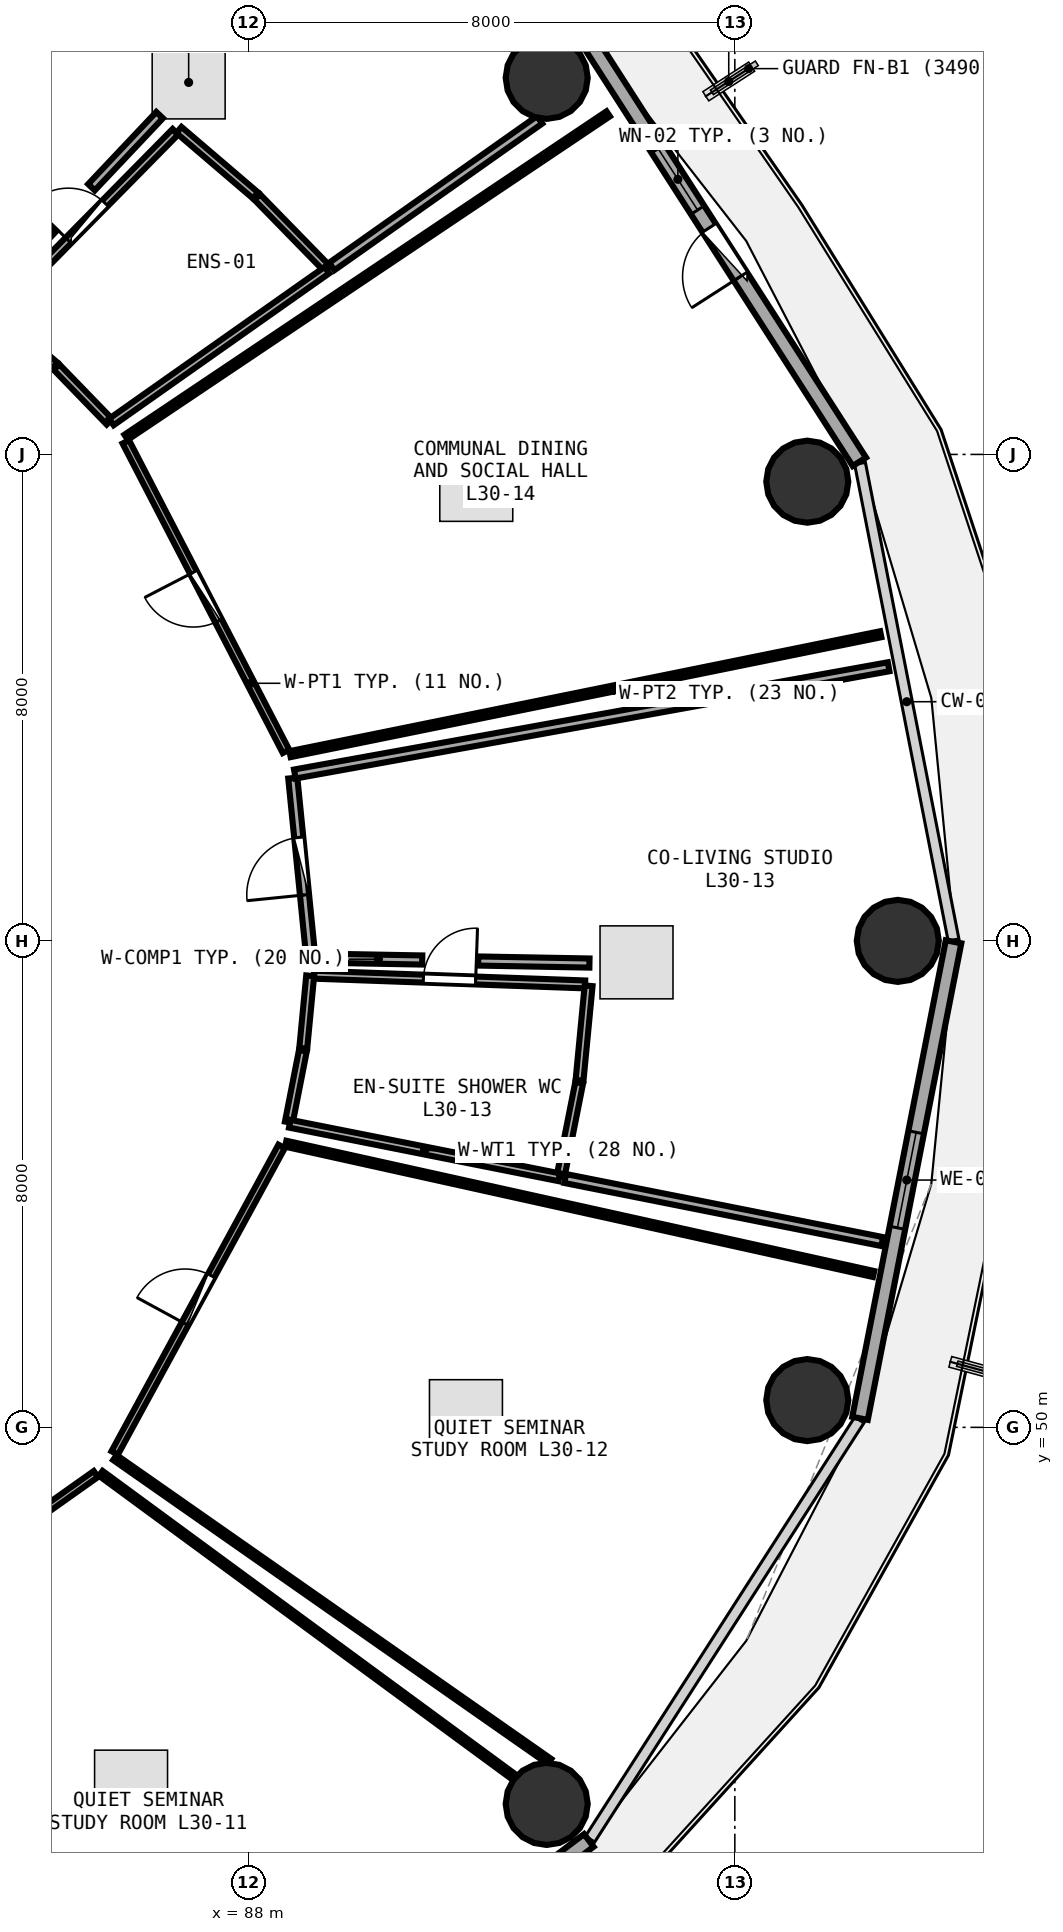
"""IFC4 building model, lengths in metres.
Left out: names, types, materials, properties, quantities, classifications, styles, units other than length and angle.
Written with IfcOpenShell. Run it as: python <this file> out.ifc"""

import sys

from ifc_helpers import new_model, si_unit, direction, frame, frame_2d, origin, origin_2d, place, context, subcontext, project, spatial, rectangle, circle, extrude, element, fill, save


model = new_model("IFC4")
c1 = context("Model", 3, precision=1e-05, world=origin(), true_north=direction((0.0, 1.0)))
c2 = subcontext(c1, "Body", "Model", "MODEL_VIEW")
j1 = project(units=[si_unit("LENGTHUNIT", "METRE"), si_unit("PLANEANGLEUNIT", "RADIAN")], contexts=[c1])
p1 = place(None, origin())
s1 = spatial("IfcSite", under=j1, at=p1, CompositionType="ELEMENT")
p2 = place(p1, origin())
s2 = spatial("IfcBuilding", under=s1, at=p2, CompositionType="ELEMENT")
p3 = place(p2, frame((0.0, 0.0, 117.6)))
s3 = spatial("IfcBuildingStorey", under=s2, at=p3, CompositionType="ELEMENT", Elevation=117.6)
for number, where, z_axis, x_axis in (
    (1, (98.68, 58.0, 0.0), (0.0, 0.0, 1.0), (1.0, 0.0, 0.0)),
    (2, (97.192, 65.552, 0.0), (0.0, 0.0, 1.0), (1.0, 0.0, 0.0)),
    (3, (92.906, 72.193, 0.0), (0.0, 0.0, 1.0), (1.0, 0.0, 0.0)),
    (4, (92.906, 43.807, 0.0), (0.0, 0.0, 1.0), (1.0, 0.0, 0.0)),
    (5, (97.192, 50.448, 0.0), (0.0, 0.0, 1.0), (1.0, 0.0, 0.0)),
):
    element("IfcColumn", number, at=place(p3, frame(where, z_axis=z_axis, x_axis=x_axis)), inside=s3, PredefinedType="COLUMN", context=c2, shape_type="SweptSolid", body=[
        extrude(circle(Radius=0.675, at=origin_2d()), origin(), (0.0, 0.0, 1.0), 3.75),
    ])
p4 = place(p3, frame((98.048, 65.879, 0.0), z_axis=(0.0, 0.0, 1.0), x_axis=(-0.540620528459, 0.841266571432, 0.0)))
e6 = element("IfcWall", 6, at=p4, inside=s3, PredefinedType="SOLIDWALL", context=c2, shape_type="SweptSolid", body=[
    extrude(rectangle(XDim=8.193, YDim=0.26, at=frame_2d((4.096, 0.0))), origin(), (0.0, 0.0, 1.0), 3.475),
])
p5 = place(p4, frame((3.621, 0.0, 0.0)))
e7 = element("IfcOpeningElement", 7, at=p5, cuts=e6, PredefinedType="OPENING", context=c2, shape_type="SweptSolid", body=[
    extrude(rectangle(XDim=0.95, YDim=2.1, at=frame_2d((0.475, 1.05))), frame((0.0, 0.14, 0.0), z_axis=(0.0, -1.0, 0.0), x_axis=(1.0, 0.0, 0.0)), (0.0, 0.0, 1.0), 0.28),
])
p6 = place(p4, frame((4.921, 0.0, 0.85)))
e8 = element("IfcOpeningElement", 8, at=p6, cuts=e6, PredefinedType="OPENING", context=c2, shape_type="SweptSolid", body=[
    extrude(rectangle(XDim=1.2, YDim=1.45, at=frame_2d((0.6, 0.725))), frame((0.0, 0.14, 0.0), z_axis=(0.0, -1.0, 0.0), x_axis=(1.0, 0.0, 0.0)), (0.0, 0.0, 1.0), 0.28),
])
p7 = place(p3, frame((86.812, 38.09, 0.0), z_axis=(0.0, 0.0, 1.0), x_axis=(0.798501507879, 0.601992808857, 0.0)))
e9 = element("IfcWall", 9, at=p7, inside=s3, PredefinedType="SOLIDWALL", context=c2, shape_type="SweptSolid", body=[
    extrude(rectangle(XDim=8.499, YDim=0.26, at=frame_2d((4.25, 0.0))), origin(), (0.0, 0.0, 1.0), 3.475),
])
p8 = place(p7, frame((3.45, 0.0, 0.85)))
e10 = element("IfcOpeningElement", 10, at=p8, cuts=e9, PredefinedType="OPENING", context=c2, shape_type="SweptSolid", body=[
    extrude(rectangle(XDim=1.6, YDim=1.45, at=frame_2d((0.8, 0.725))), frame((0.0, 0.14, 0.0), z_axis=(0.0, -1.0, 0.0), x_axis=(1.0, 0.0, 0.0)), (0.0, 0.0, 1.0), 0.28),
])
p9 = place(p3, frame((98.059, 50.148, 0.0), z_axis=(0.0, 0.0, 1.0), x_axis=(0.192581843632, 0.981280914674, 0.0)))
e11 = element("IfcWall", 11, at=p9, inside=s3, PredefinedType="SOLIDWALL", context=c2, shape_type="SweptSolid", body=[
    extrude(rectangle(XDim=7.987, YDim=0.26, at=frame_2d((3.993, 0.0))), origin(), (0.0, 0.0, 1.0), 3.475),
])
p10 = place(p9, frame((3.193, 0.0, 0.85)))
e12 = element("IfcOpeningElement", 12, at=p10, cuts=e11, PredefinedType="OPENING", context=c2, shape_type="SweptSolid", body=[
    extrude(rectangle(XDim=1.6, YDim=1.45, at=frame_2d((0.8, 0.725))), frame((0.0, 0.14, 0.0), z_axis=(0.0, -1.0, 0.0), x_axis=(1.0, 0.0, 0.0)), (0.0, 0.0, 1.0), 0.28),
])
p11 = place(p3, frame((83.883, 68.345, 0.0), z_axis=(0.0, 0.0, 1.0), x_axis=(0.70168270288, 0.712489567979, 0.0)))
e13 = element("IfcWall", 13, at=p11, inside=s3, PredefinedType="PLUMBINGWALL", context=c2, shape_type="SweptSolid", body=[
    extrude(rectangle(XDim=4.157, YDim=0.13, at=frame_2d((2.078, 0.0))), origin(), (0.0, 0.0, 1.0), 3.175),
])
p12 = place(p11, frame((1.648, 0.0, 0.0)))
e14 = element("IfcOpeningElement", 14, at=p12, cuts=e13, PredefinedType="OPENING", context=c2, shape_type="SweptSolid", body=[
    extrude(rectangle(XDim=0.86, YDim=2.05, at=frame_2d((0.43, 1.025))), frame((0.0, 0.075, 0.0), z_axis=(0.0, -1.0, 0.0), x_axis=(1.0, 0.0, 0.0)), (0.0, 0.0, 1.0), 0.15),
])
p13 = place(p3, frame((80.601, 45.768, 0.0), z_axis=(0.0, 0.0, 1.0), x_axis=(0.815932399176, 0.578147316846, 0.0)))
e15 = element("IfcWall", 15, at=p13, inside=s3, PredefinedType="PARTITIONING", context=c2, shape_type="SweptSolid", body=[
    extrude(rectangle(XDim=5.993, YDim=0.12, at=frame_2d((2.997, 0.0))), origin(), (0.0, 0.0, 1.0), 2.925),
])
p14 = place(p13, frame((2.546, 0.0, 0.0)))
e16 = element("IfcOpeningElement", 16, at=p14, cuts=e15, PredefinedType="OPENING", context=c2, shape_type="SweptSolid", body=[
    extrude(rectangle(XDim=0.9, YDim=2.08, at=frame_2d((0.45, 1.04))), frame((0.0, 0.07, 0.0), z_axis=(0.0, -1.0, 0.0), x_axis=(1.0, 0.0, 0.0)), (0.0, 0.0, 1.0), 0.14),
])
p15 = place(p3, frame((85.801, 49.579, 0.0), z_axis=(0.0, 0.0, 1.0), x_axis=(0.478256103777, 0.878220416069, 0.0)))
e17 = element("IfcWall", 17, at=p15, inside=s3, PredefinedType="PARTITIONING", context=c2, shape_type="SweptSolid", body=[
    extrude(rectangle(XDim=5.741, YDim=0.12, at=frame_2d((2.871, 0.0))), origin(), (0.0, 0.0, 1.0), 2.925),
])
p16 = place(p15, frame((2.42, 0.0, 0.0)))
e18 = element("IfcOpeningElement", 18, at=p16, cuts=e17, PredefinedType="OPENING", context=c2, shape_type="SweptSolid", body=[
    extrude(rectangle(XDim=0.9, YDim=2.08, at=frame_2d((0.45, 1.04))), frame((0.0, 0.07, 0.0), z_axis=(0.0, -1.0, 0.0), x_axis=(1.0, 0.0, 0.0)), (0.0, 0.0, 1.0), 0.14),
])
p17 = place(p3, frame((89.078, 57.444, 0.0), z_axis=(0.0, 0.0, 1.0), x_axis=(0.999359574241, -0.035783255492, 0.0)))
e19 = element("IfcWall", 19, at=p17, inside=s3, PredefinedType="PLUMBINGWALL", context=c2, shape_type="SweptSolid", body=[
    extrude(rectangle(XDim=4.462, YDim=0.13, at=frame_2d((2.231, 0.0))), origin(), (0.0, 0.0, 1.0), 3.175),
])
p18 = place(p17, frame((1.801, 0.0, 0.0)))
e20 = element("IfcOpeningElement", 20, at=p18, cuts=e19, PredefinedType="OPENING", context=c2, shape_type="SweptSolid", body=[
    extrude(rectangle(XDim=0.86, YDim=2.05, at=frame_2d((0.43, 1.025))), frame((0.0, 0.075, 0.0), z_axis=(0.0, -1.0, 0.0), x_axis=(1.0, 0.0, 0.0)), (0.0, 0.0, 1.0), 0.15),
])
p19 = place(p3, frame((89.021, 57.779, 0.0), z_axis=(0.0, 0.0, 1.0), x_axis=(-0.099902017985, 0.994997279797, 0.0)))
e21 = element("IfcWall", 21, at=p19, inside=s3, PredefinedType="PARTITIONING", context=c2, shape_type="SweptSolid", body=[
    extrude(rectangle(XDim=2.913, YDim=0.15, at=frame_2d((1.457, 0.0))), origin(), (0.0, 0.0, 1.0), 2.925),
])
p20 = place(p19, frame((0.982, 0.0, 0.0)))
e22 = element("IfcOpeningElement", 22, at=p20, cuts=e21, PredefinedType="OPENING", context=c2, shape_type="SweptSolid", body=[
    extrude(rectangle(XDim=0.95, YDim=2.08, at=frame_2d((0.475, 1.04))), frame((0.0, 0.085, 0.0), z_axis=(0.0, -1.0, 0.0), x_axis=(1.0, 0.0, 0.0)), (0.0, 0.0, 1.0), 0.17),
])
p21 = place(p3, frame((88.618, 61.116, 0.0), z_axis=(0.0, 0.0, 1.0), x_axis=(-0.459658120373, 0.88809594773, 0.0)))
e23 = element("IfcWall", 23, at=p21, inside=s3, PredefinedType="PARTITIONING", context=c2, shape_type="SweptSolid", body=[
    extrude(rectangle(XDim=5.732, YDim=0.12, at=frame_2d((2.866, 0.0))), origin(), (0.0, 0.0, 1.0), 2.925),
])
p22 = place(p21, frame((2.416, 0.0, 0.0)))
e24 = element("IfcOpeningElement", 24, at=p22, cuts=e23, PredefinedType="OPENING", context=c2, shape_type="SweptSolid", body=[
    extrude(rectangle(XDim=0.9, YDim=2.08, at=frame_2d((0.45, 1.04))), frame((0.0, 0.07, 0.0), z_axis=(0.0, -1.0, 0.0), x_axis=(1.0, 0.0, 0.0)), (0.0, 0.0, 1.0), 0.14),
])
p23 = place(p3, frame((85.716, 66.536, 0.0), z_axis=(0.0, 0.0, 1.0), x_axis=(-0.695817197704, 0.718218927194, 0.0)))
e25 = element("IfcWall", 25, at=p23, inside=s3, PredefinedType="PLUMBINGWALL", context=c2, shape_type="SweptSolid", body=[
    extrude(rectangle(XDim=1.253, YDim=0.13, at=frame_2d((0.627, 0.0))), origin(), (0.0, 0.0, 1.0), 2.925),
])
p24 = place(p3, frame((84.815, 67.464, 0.0), z_axis=(0.0, 0.0, 1.0), x_axis=(-0.757933178543, 0.652332198242, 0.0)))
e26 = element("IfcWall", 26, at=p24, inside=s3, PredefinedType="PLUMBINGWALL", context=c2, shape_type="SweptSolid", body=[
    extrude(rectangle(XDim=1.265, YDim=0.13, at=frame_2d((0.632, 0.0))), origin(), (0.0, 0.0, 1.0), 3.48),
])
p25 = place(p3, frame((86.857, 71.336, 0.0), z_axis=(0.0, 0.0, 1.0), x_axis=(0.760056789813, -0.649856658241, 0.0)))
e27 = element("IfcWall", 27, at=p25, inside=s3, PredefinedType="PLUMBINGWALL", context=c2, shape_type="SweptSolid", body=[
    extrude(rectangle(XDim=1.657, YDim=0.13, at=frame_2d((0.829, 0.0))), origin(), (0.0, 0.0, 1.0), 3.48),
])
p26 = place(p3, frame((88.146, 70.232, 0.0), z_axis=(0.0, 0.0, 1.0), x_axis=(0.698431593966, -0.715676818508, 0.0)))
e28 = element("IfcWall", 28, at=p26, inside=s3, PredefinedType="PLUMBINGWALL", context=c2, shape_type="SweptSolid", body=[
    extrude(rectangle(XDim=1.642, YDim=0.13, at=frame_2d((0.821, 0.0))), origin(), (0.0, 0.0, 1.0), 2.925),
])
p27 = place(p3, frame((89.291, 69.031, 0.0), z_axis=(0.0, 0.0, 1.0), x_axis=(-0.817498099131, -0.575931296178, 0.0)))
e29 = element("IfcWall", 29, at=p27, inside=s3, PredefinedType="PLUMBINGWALL", context=c2, shape_type="SweptSolid", body=[
    extrude(rectangle(XDim=4.336, YDim=0.13, at=frame_2d((2.168, 0.0))), origin(), (0.0, 0.0, 1.0), 3.175),
])
p28 = place(p3, frame((80.84, 70.181, 0.0), z_axis=(0.0, 0.0, 1.0), x_axis=(0.500668535271, 0.865639080558, 0.0)))
e30 = element("IfcWall", 30, at=p28, inside=s3, PredefinedType="PARTITIONING", context=c2, shape_type="SweptSolid", body=[
    extrude(rectangle(XDim=9.03, YDim=0.15, at=frame_2d((4.515, 0.0))), origin(), (0.0, 0.0, 1.0), 2.925),
])
p29 = place(p3, frame((92.79, 71.502, 0.0), z_axis=(0.0, 0.0, 1.0), x_axis=(-0.817102044885, -0.576493060015, 0.0)))
e31 = element("IfcWall", 31, at=p29, inside=s3, PredefinedType="PARTITIONING", context=c2, shape_type="SweptSolid", body=[
    extrude(rectangle(XDim=4.185, YDim=0.15, at=frame_2d((2.092, 0.0))), origin(), (0.0, 0.0, 1.0), 3.235),
])
p30 = place(p3, frame((86.54, 71.58, 0.0), z_axis=(0.0, 0.0, 1.0), x_axis=(-0.68661474407, -0.727021453071, 0.0)))
e32 = element("IfcWall", 32, at=p30, inside=s3, PredefinedType="PARTITIONING", context=c2, shape_type="SweptSolid", body=[
    extrude(rectangle(XDim=1.631, YDim=0.15, at=frame_2d((0.816, 0.0))), origin(), (0.0, 0.0, 1.0), 3.175),
])
p31 = place(p3, frame((84.788, 69.725, 0.0), z_axis=(0.0, 0.0, 1.0), x_axis=(-0.686614966265, -0.727021243226, 0.0)))
e33 = element("IfcWall", 33, at=p31, inside=s3, PredefinedType="PARTITIONING", context=c2, shape_type="SweptSolid", body=[
    extrude(rectangle(XDim=1.674, YDim=0.15, at=frame_2d((0.837, 0.0))), origin(), (0.0, 0.0, 1.0), 3.235),
])
p32 = place(p3, frame((84.812, 78.241, 0.0), z_axis=(0.0, 0.0, 1.0), x_axis=(-0.477645693392, -0.878552554822, 0.0)))
e34 = element("IfcWall", 34, at=p32, inside=s3, PredefinedType="PARTITIONING", context=c2, shape_type="SweptSolid", body=[
    extrude(rectangle(XDim=9.007, YDim=0.1, at=frame_2d((4.503, 0.0))), origin(), (0.0, 0.0, 1.0), 2.925),
])
p33 = place(p3, frame((85.572, 49.243, 0.0), z_axis=(0.0, 0.0, 1.0), x_axis=(0.805852200235, -0.592116737963, 0.0)))
e35 = element("IfcWall", 35, at=p33, inside=s3, PredefinedType="PARTITIONING", context=c2, shape_type="SweptSolid", body=[
    extrude(rectangle(XDim=8.43, YDim=0.1, at=frame_2d((4.215, 0.0))), origin(), (0.0, 0.0, 1.0), 2.925),
])
p34 = place(p3, frame((84.913, 37.803, 0.0), z_axis=(0.0, 0.0, 1.0), x_axis=(-0.481837612944, 0.876260529039, 0.0)))
e36 = element("IfcWall", 36, at=p34, inside=s3, PredefinedType="PARTITIONING", context=c2, shape_type="SweptSolid", body=[
    extrude(rectangle(XDim=9.01, YDim=0.1, at=frame_2d((4.505, 0.0))), origin(), (0.0, 0.0, 1.0), 2.925),
])
p35 = place(p3, frame((88.614, 54.664, 0.0), z_axis=(0.0, 0.0, 1.0), x_axis=(0.976312199438, -0.216366562178, 0.0)))
e37 = element("IfcWall", 37, at=p35, inside=s3, PredefinedType="PARTITIONING", context=c2, shape_type="SweptSolid", body=[
    extrude(rectangle(XDim=9.903, YDim=0.1, at=frame_2d((4.951, 0.0))), origin(), (0.0, 0.0, 1.0), 2.975),
])
p36 = place(p3, frame((92.953, 44.506, 0.0), z_axis=(0.0, 0.0, 1.0), x_axis=(-0.8195552972, 0.573000100201, 0.0)))
e38 = element("IfcWall", 38, at=p36, inside=s3, PredefinedType="PARTITIONING", context=c2, shape_type="SweptSolid", body=[
    extrude(rectangle(XDim=8.722, YDim=0.1, at=frame_2d((4.361, 0.0))), origin(), (0.0, 0.0, 1.0), 3.175),
])
p37 = place(p3, frame((88.665, 55.017, 0.0), z_axis=(0.0, 0.0, 1.0), x_axis=(0.192633384292, 0.981270798127, 0.0)))
e39 = element("IfcWall", 39, at=p37, inside=s3, PredefinedType="PLUMBINGWALL", context=c2, shape_type="SweptSolid", body=[
    extrude(rectangle(XDim=1.2, YDim=0.13, at=frame_2d((0.6, 0.0))), origin(), (0.0, 0.0, 1.0), 3.48),
])
p38 = place(p3, frame((88.902, 56.234, 0.0), z_axis=(0.0, 0.0, 1.0), x_axis=(0.095405531976, 0.995438488541, 0.0)))
e40 = element("IfcWall", 40, at=p38, inside=s3, PredefinedType="PLUMBINGWALL", context=c2, shape_type="SweptSolid", body=[
    extrude(rectangle(XDim=1.198, YDim=0.13, at=frame_2d((0.599, 0.0))), origin(), (0.0, 0.0, 1.0), 3.48),
])
p39 = place(p3, frame((93.595, 57.262, 0.0), z_axis=(0.0, 0.0, 1.0), x_axis=(-0.095560666353, -0.995423607841, 0.0)))
e41 = element("IfcWall", 41, at=p39, inside=s3, PredefinedType="PLUMBINGWALL", context=c2, shape_type="SweptSolid", body=[
    extrude(rectangle(XDim=1.563, YDim=0.13, at=frame_2d((0.782, 0.0))), origin(), (0.0, 0.0, 1.0), 3.48),
])
p40 = place(p3, frame((93.44, 55.667, 0.0), z_axis=(0.0, 0.0, 1.0), x_axis=(-0.194648564843, -0.980873047955, 0.0)))
e42 = element("IfcWall", 42, at=p40, inside=s3, PredefinedType="PLUMBINGWALL", context=c2, shape_type="SweptSolid", body=[
    extrude(rectangle(XDim=1.568, YDim=0.13, at=frame_2d((0.784, 0.0))), origin(), (0.0, 0.0, 1.0), 3.48),
])
p41 = place(p3, frame((93.111, 54.113, 0.0), z_axis=(0.0, 0.0, 1.0), x_axis=(-0.980825194025, 0.194889555304, 0.0)))
e43 = element("IfcWall", 43, at=p41, inside=s3, PredefinedType="PLUMBINGWALL", context=c2, shape_type="SweptSolid", body=[
    extrude(rectangle(XDim=4.517, YDim=0.13, at=frame_2d((2.259, 0.0))), origin(), (0.0, 0.0, 1.0), 3.175),
])
p42 = place(p3, frame((88.763, 60.744, 0.0), z_axis=(0.0, 0.0, 1.0), x_axis=(0.984081766615, 0.177716281237, 0.0)))
e44 = element("IfcWall", 44, at=p42, inside=s3, PredefinedType="PARTITIONING", context=c2, shape_type="SweptSolid", body=[
    extrude(rectangle(XDim=9.924, YDim=0.15, at=frame_2d((4.962, 0.0))), origin(), (0.0, 0.0, 1.0), 2.975),
])
p43 = place(p3, frame((98.425, 53.055, 0.0), z_axis=(0.0, 0.0, 1.0), x_axis=(-0.980779700981, 0.195118369572, 0.0)))
e45 = element("IfcWall", 45, at=p43, inside=s3, PredefinedType="PARTITIONING", context=c2, shape_type="SweptSolid", body=[
    extrude(rectangle(XDim=5.318, YDim=0.15, at=frame_2d((2.659, 0.0))), origin(), (0.0, 0.0, 1.0), 2.975),
])
p44 = place(p3, frame((93.609, 57.636, 0.0), z_axis=(0.0, 0.0, 1.0), x_axis=(-0.999835456222, 0.018140024286, 0.0)))
e46 = element("IfcWall", 46, at=p44, inside=s3, PredefinedType="PARTITIONING", context=c2, shape_type="SweptSolid", body=[
    extrude(rectangle(XDim=1.83, YDim=0.15, at=frame_2d((0.915, 0.0))), origin(), (0.0, 0.0, 1.0), 3.175),
])
p45 = place(p3, frame((90.859, 57.686, 0.0), z_axis=(0.0, 0.0, 1.0), x_axis=(-0.999835980019, 0.018111130838, 0.0)))
e47 = element("IfcWall", 47, at=p45, inside=s3, PredefinedType="PARTITIONING", context=c2, shape_type="SweptSolid", body=[
    extrude(rectangle(XDim=1.442, YDim=0.15, at=frame_2d((0.721, 0.0))), origin(), (0.0, 0.0, 1.0), 3.48),
])
p46 = place(p3, frame((85.989, 66.282, 0.0), z_axis=(0.0, 0.0, 1.0), x_axis=(0.830433607217, 0.557117603388, 0.0)))
e48 = element("IfcWall", 48, at=p46, inside=s3, PredefinedType="PARTITIONING", context=c2, shape_type="SweptSolid", body=[
    extrude(rectangle(XDim=9.546, YDim=0.1, at=frame_2d((4.773, 0.0))), origin(), (0.0, 0.0, 1.0), 2.975),
])
p47 = place(p3, frame((98.4, 63.043, 0.0), z_axis=(0.0, 0.0, 1.0), x_axis=(-0.980013960975, -0.198928721641, 0.0)))
e49 = element("IfcWall", 49, at=p47, inside=s3, PredefinedType="PARTITIONING", context=c2, shape_type="SweptSolid", body=[
    extrude(rectangle(XDim=9.913, YDim=0.1, at=frame_2d((4.956, 0.0))), origin(), (0.0, 0.0, 1.0), 2.975),
])
p48 = place(p5, frame((0.95, 0.0, 0.0), z_axis=(0.0, 0.0, 1.0), x_axis=(-1.0, 0.0, 0.0)))
e50 = element("IfcDoor", 50, at=p48, inside=s3, OperationType="SINGLE_SWING_RIGHT", PredefinedType="DOOR", context=c2, shape_type="SweptSolid", body=[
    extrude(rectangle(XDim=0.95, YDim=2.1, at=frame_2d((0.475, 1.05))), frame((0.0, 0.025, 0.0), z_axis=(0.0, -1.0, 0.0), x_axis=(1.0, 0.0, 0.0)), (0.0, 0.0, 1.0), 0.05),
])
fill(e7, e50)
p49 = place(p6, origin())
e51 = element("IfcWindow", 51, at=p49, inside=s3, PartitioningType="SINGLE_PANEL", PredefinedType="WINDOW", context=c2, shape_type="SweptSolid", body=[
    extrude(rectangle(XDim=1.2, YDim=1.45, at=frame_2d((0.6, 0.725))), frame((0.0, 0.03, 0.0), z_axis=(0.0, -1.0, 0.0), x_axis=(1.0, 0.0, 0.0)), (0.0, 0.0, 1.0), 0.06),
])
fill(e8, e51)
p50 = place(p10, origin())
e52 = element("IfcWindow", 52, at=p50, inside=s3, PartitioningType="SINGLE_PANEL", PredefinedType="WINDOW", context=c2, shape_type="SweptSolid", body=[
    extrude(rectangle(XDim=1.6, YDim=1.45, at=frame_2d((0.8, 0.725))), frame((0.0, 0.03, 0.0), z_axis=(0.0, -1.0, 0.0), x_axis=(1.0, 0.0, 0.0)), (0.0, 0.0, 1.0), 0.06),
])
fill(e12, e52)
p51 = place(p12, origin())
e53 = element("IfcDoor", 53, at=p51, inside=s3, OperationType="SINGLE_SWING_LEFT", PredefinedType="DOOR", context=c2, shape_type="SweptSolid", body=[
    extrude(rectangle(XDim=0.86, YDim=2.05, at=frame_2d((0.43, 1.025))), frame((0.0, 0.025, 0.0), z_axis=(0.0, -1.0, 0.0), x_axis=(1.0, 0.0, 0.0)), (0.0, 0.0, 1.0), 0.05),
])
fill(e14, e53)
p52 = place(p16, origin())
e54 = element("IfcDoor", 54, at=p52, inside=s3, OperationType="SINGLE_SWING_LEFT", PredefinedType="DOOR", context=c2, shape_type="SweptSolid", body=[
    extrude(rectangle(XDim=0.9, YDim=2.08, at=frame_2d((0.45, 1.04))), frame((0.0, 0.025, 0.0), z_axis=(0.0, -1.0, 0.0), x_axis=(1.0, 0.0, 0.0)), (0.0, 0.0, 1.0), 0.05),
])
fill(e18, e54)
p53 = place(p18, origin())
e55 = element("IfcDoor", 55, at=p53, inside=s3, OperationType="SINGLE_SWING_RIGHT", PredefinedType="DOOR", context=c2, shape_type="SweptSolid", body=[
    extrude(rectangle(XDim=0.86, YDim=2.05, at=frame_2d((0.43, 1.025))), frame((0.0, 0.025, 0.0), z_axis=(0.0, -1.0, 0.0), x_axis=(1.0, 0.0, 0.0)), (0.0, 0.0, 1.0), 0.05),
])
fill(e20, e55)
p54 = place(p20, origin())
e56 = element("IfcDoor", 56, at=p54, inside=s3, OperationType="SINGLE_SWING_LEFT", PredefinedType="DOOR", context=c2, shape_type="SweptSolid", body=[
    extrude(rectangle(XDim=0.95, YDim=2.08, at=frame_2d((0.475, 1.04))), frame((0.0, 0.025, 0.0), z_axis=(0.0, -1.0, 0.0), x_axis=(1.0, 0.0, 0.0)), (0.0, 0.0, 1.0), 0.05),
])
fill(e22, e56)
p55 = place(p22, origin())
e57 = element("IfcDoor", 57, at=p55, inside=s3, OperationType="SINGLE_SWING_RIGHT", PredefinedType="DOOR", context=c2, shape_type="SweptSolid", body=[
    extrude(rectangle(XDim=0.9, YDim=2.08, at=frame_2d((0.45, 1.04))), frame((0.0, 0.025, 0.0), z_axis=(0.0, -1.0, 0.0), x_axis=(1.0, 0.0, 0.0)), (0.0, 0.0, 1.0), 0.05),
])
fill(e24, e57)
save(model, sys.argv[1])
